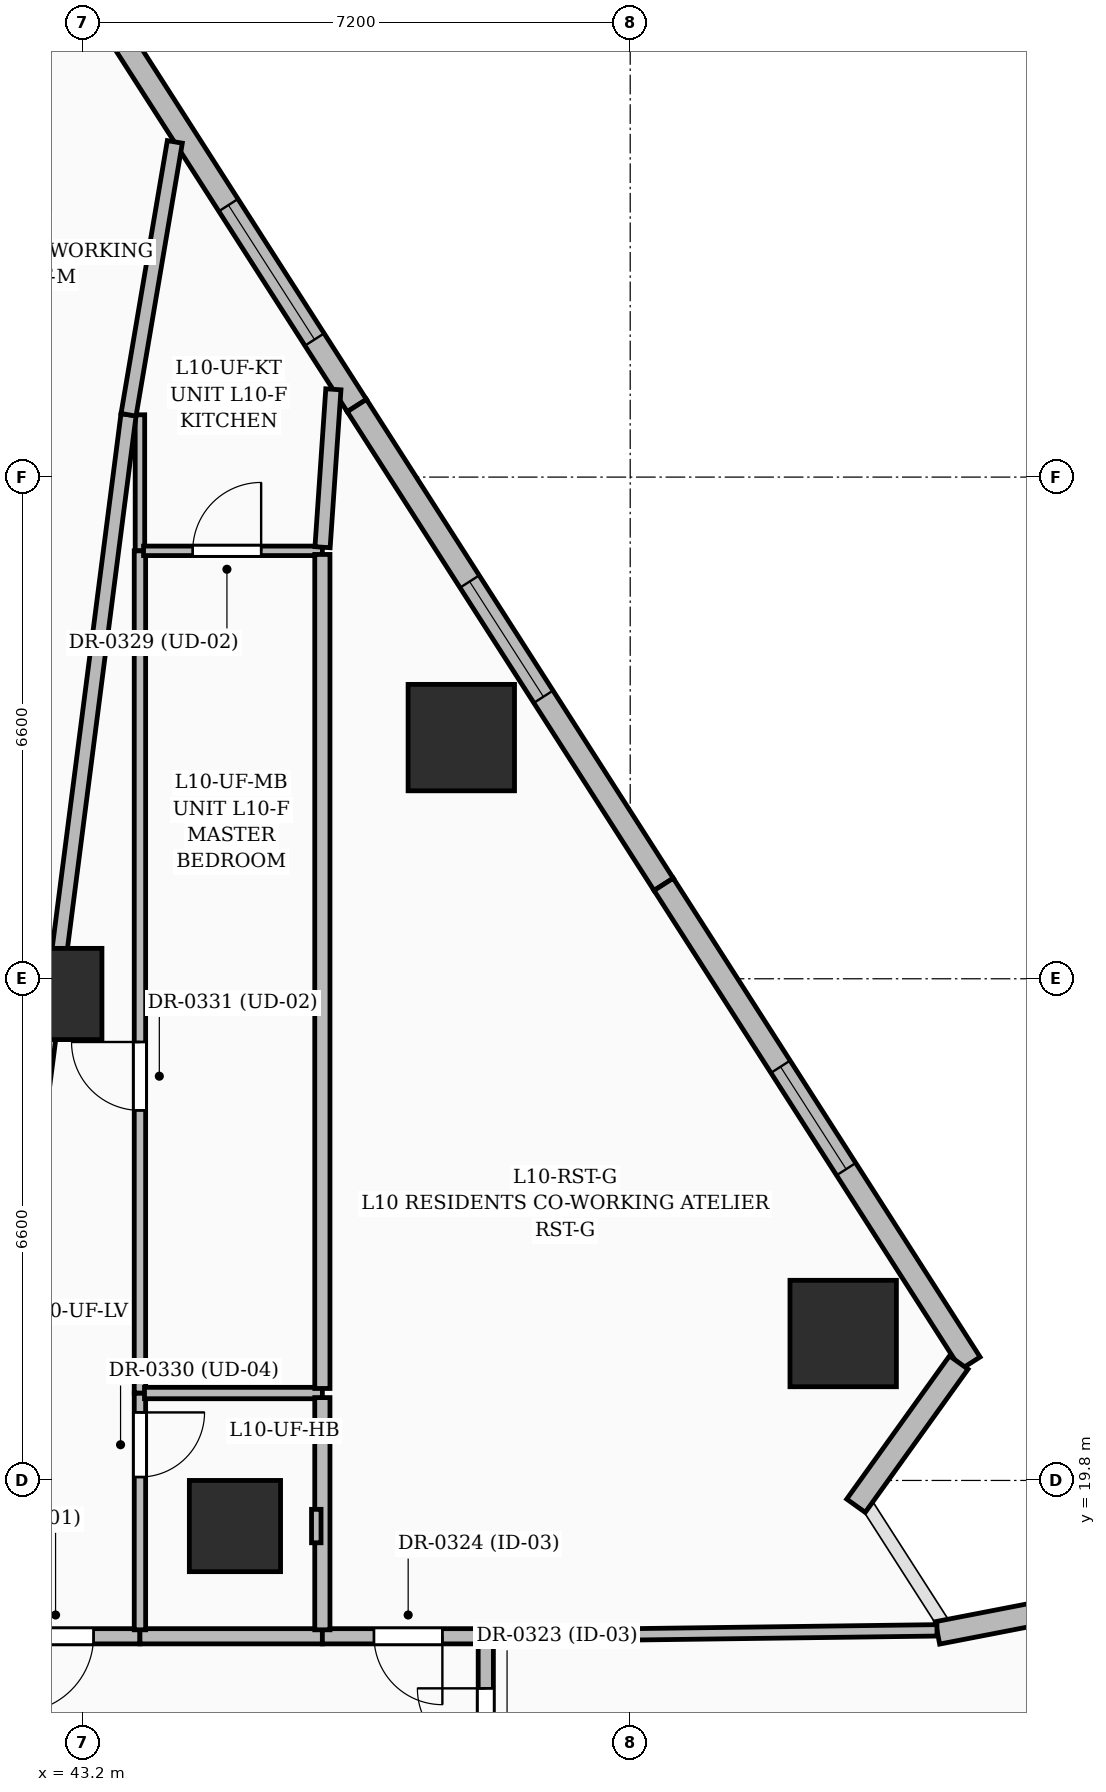
"""IFC4 building model, lengths in metres.
Left out: names, types, materials, properties, quantities, classifications, styles, units other than length and angle.
Written with IfcOpenShell. Run it as: python <this file> out.ifc"""

import sys

from ifc_helpers import new_model, si_unit, direction, frame, frame_2d, origin, origin_2d, place, context, subcontext, project, spatial, rectangle, extrude, element, fill, save


model = new_model("IFC4")
c1 = context("Model", 3, precision=1e-05, world=origin(), true_north=direction((0.0, 1.0)))
c2 = subcontext(c1, "Body", "Model", "MODEL_VIEW")
j1 = project(units=[si_unit("LENGTHUNIT", "METRE"), si_unit("PLANEANGLEUNIT", "RADIAN")], contexts=[c1])
p1 = place(None, origin())
s1 = spatial("IfcSite", under=j1, at=p1, CompositionType="ELEMENT")
p2 = place(p1, origin())
s2 = spatial("IfcBuilding", under=s1, at=p2, CompositionType="ELEMENT")
p3 = place(p2, frame((0.0, 0.0, 46.2)))
s3 = spatial("IfcBuildingStorey", under=s2, at=p3, CompositionType="ELEMENT", Elevation=46.2)
for number, where, z_axis, x_axis in (
    (1, (45.2, 19.2, 0.0), (0.0, 0.0, 1.0), (1.0, 0.0, 0.0)),
    (2, (42.85, 26.2, 0.0), (0.0, 0.0, 1.0), (1.0, 0.0, 0.0)),
):
    element("IfcColumn", number, at=place(p3, frame(where, z_axis=z_axis, x_axis=x_axis)), inside=s3, PredefinedType="COLUMN", context=c2, shape_type="SweptSolid", body=[
        extrude(rectangle(XDim=1.2, YDim=1.2, at=origin_2d()), origin(), (0.0, 0.0, 1.0), 3.6),
    ])
for number, where, z_axis, x_axis in (
    (3, (53.202, 21.733, 0.0), (0.0, 0.0, 1.0), (1.0, 0.0, 0.0)),
    (4, (48.178, 29.573, 0.0), (0.0, 0.0, 1.0), (1.0, 0.0, 0.0)),
):
    element("IfcColumn", number, at=place(p3, frame(where, z_axis=z_axis, x_axis=x_axis)), inside=s3, PredefinedType="COLUMN", context=c2, shape_type="SweptSolid", body=[
        extrude(rectangle(XDim=1.4, YDim=1.4, at=origin_2d()), origin(), (0.0, 0.0, 1.0), 3.6),
    ])
p4 = place(p3, frame((42.767, 40.241, 0.0), z_axis=(0.0, 0.0, 1.0), x_axis=(0.539510136354, -0.841979104712, 0.0)))
e5 = element("IfcWall", 5, at=p4, inside=s3, PredefinedType="SOLIDWALL", context=c2, shape_type="SweptSolid", body=[
    extrude(rectangle(XDim=7.481, YDim=0.3, at=frame_2d((3.741, 0.0))), origin(), (0.0, 0.0, 1.0), 3.35),
])
p5 = place(p4, frame((4.35, 0.0, 0.55)))
e6 = element("IfcOpeningElement", 6, at=p5, cuts=e5, PredefinedType="OPENING", context=c2, shape_type="SweptSolid", body=[
    extrude(rectangle(XDim=2.1, YDim=2.4, at=frame_2d((1.05, 1.2))), frame((0.0, 0.16, 0.0), z_axis=(0.0, -1.0, 0.0), x_axis=(1.0, 0.0, 0.0)), (0.0, 0.0, 1.0), 0.32),
])
p6 = place(p3, frame((46.803, 33.941, 0.0), z_axis=(0.0, 0.0, 1.0), x_axis=(0.539548093607, -0.841954781853, 0.0)))
e7 = element("IfcWall", 7, at=p6, inside=s3, PredefinedType="SOLIDWALL", context=c2, shape_type="SweptSolid", body=[
    extrude(rectangle(XDim=7.481, YDim=0.3, at=frame_2d((3.741, 0.0))), origin(), (0.0, 0.0, 1.0), 3.35),
])
p7 = place(p6, frame((2.75, 0.0, 0.6)))
e8 = element("IfcOpeningElement", 8, at=p7, cuts=e7, PredefinedType="OPENING", context=c2, shape_type="SweptSolid", body=[
    extrude(rectangle(XDim=1.8, YDim=2.1, at=frame_2d((0.9, 1.05))), frame((0.0, 0.16, 0.0), z_axis=(0.0, -1.0, 0.0), x_axis=(1.0, 0.0, 0.0)), (0.0, 0.0, 1.0), 0.32),
])
p8 = place(p3, frame((50.84, 27.642, 0.0), z_axis=(0.0, 0.0, 1.0), x_axis=(0.539510136354, -0.841979104712, 0.0)))
e9 = element("IfcWall", 9, at=p8, inside=s3, PredefinedType="SOLIDWALL", context=c2, shape_type="SweptSolid", body=[
    extrude(rectangle(XDim=7.481, YDim=0.3, at=frame_2d((3.741, 0.0))), origin(), (0.0, 0.0, 1.0), 3.35),
])
p9 = place(p8, frame((2.85, 0.0, 0.55)))
e10 = element("IfcOpeningElement", 10, at=p9, cuts=e9, PredefinedType="OPENING", context=c2, shape_type="SweptSolid", body=[
    extrude(rectangle(XDim=1.6, YDim=2.2, at=frame_2d((0.8, 1.1))), frame((0.0, 0.16, 0.0), z_axis=(0.0, -1.0, 0.0), x_axis=(1.0, 0.0, 0.0)), (0.0, 0.0, 1.0), 0.32),
])
p10 = place(p3, frame((54.722, 21.351, 0.0), z_axis=(0.0, 0.0, 1.0), x_axis=(-0.58303932792, -0.812443931665, 0.0)))
e11 = element("IfcWall", 11, at=p10, inside=s3, PredefinedType="SOLIDWALL", context=c2, shape_type="SweptSolid", body=[
    extrude(rectangle(XDim=2.319, YDim=0.3, at=frame_2d((1.16, 0.0))), origin(), (0.0, 0.0, 1.0), 2.375),
])
p11 = place(p3, frame((54.443, 17.794, 0.0), z_axis=(0.0, 0.0, 1.0), x_axis=(0.981746971615, 0.190191702567, 0.0)))
e12 = element("IfcWall", 12, at=p11, inside=s3, PredefinedType="SOLIDWALL", context=c2, shape_type="SweptSolid", body=[
    extrude(rectangle(XDim=2.593, YDim=0.3, at=frame_2d((1.296, 0.0))), origin(), (0.0, 0.0, 1.0), 2.375),
])
p12 = place(p3, frame((48.5, 15.48, 0.0), z_axis=(0.0, 0.0, 1.0), x_axis=(0.0, 1.0, 0.0)))
e13 = element("IfcWall", 13, at=p12, inside=s3, PredefinedType="PARTITIONING", context=c2, shape_type="SweptSolid", body=[
    extrude(rectangle(XDim=2.27, YDim=0.2, at=frame_2d((1.135, 0.0))), origin(), (0.0, 0.0, 1.0), 2.279),
])
p13 = place(p12, frame((0.685, 0.0, 0.0)))
e14 = element("IfcOpeningElement", 14, at=p13, cuts=e13, PredefinedType="OPENING", context=c2, shape_type="SweptSolid", body=[
    extrude(rectangle(XDim=0.9, YDim=2.1, at=frame_2d((0.45, 1.05))), frame((0.0, 0.11, 0.0), z_axis=(0.0, -1.0, 0.0), x_axis=(1.0, 0.0, 0.0)), (0.0, 0.0, 1.0), 0.22),
])
p14 = place(p3, frame((43.95, 17.75, 0.0), z_axis=(0.0, 0.0, 1.0), x_axis=(-1.0, 0.0, 0.0)))
e15 = element("IfcWall", 15, at=p14, inside=s3, PredefinedType="PARTITIONING", context=c2, shape_type="SweptSolid", body=[
    extrude(rectangle(XDim=2.22, YDim=0.2, at=frame_2d((1.11, 0.0))), origin(), (0.0, 0.0, 1.0), 3.35),
])
p15 = place(p14, frame((0.61, 0.0, 0.0)))
e16 = element("IfcOpeningElement", 16, at=p15, cuts=e15, PredefinedType="OPENING", context=c2, shape_type="SweptSolid", body=[
    extrude(rectangle(XDim=1.0, YDim=2.2, at=frame_2d((0.5, 1.1))), frame((0.0, 0.11, 0.0), z_axis=(0.0, -1.0, 0.0), x_axis=(1.0, 0.0, 0.0)), (0.0, 0.0, 1.0), 0.22),
])
p16 = place(p3, frame((46.35, 17.75, 0.0), z_axis=(0.0, 0.0, 1.0), x_axis=(-1.0, 0.0, 0.0)))
e17 = element("IfcWall", 17, at=p16, inside=s3, PredefinedType="PARTITIONING", context=c2, shape_type="SweptSolid", body=[
    extrude(rectangle(XDim=2.4, YDim=0.2, at=frame_2d((1.2, 0.0))), origin(), (0.0, 0.0, 1.0), 2.309),
])
p17 = place(p3, frame((48.415, 17.75, 0.0), z_axis=(0.0, 0.0, 1.0), x_axis=(-1.0, 0.0, 0.0)))
e18 = element("IfcWall", 18, at=p17, inside=s3, PredefinedType="PARTITIONING", context=c2, shape_type="SweptSolid", body=[
    extrude(rectangle(XDim=2.065, YDim=0.2, at=frame_2d((1.032, 0.0))), origin(), (0.0, 0.0, 1.0), 2.86),
])
p18 = place(p17, frame((0.486, 0.0, 0.0)))
e19 = element("IfcOpeningElement", 19, at=p18, cuts=e18, PredefinedType="OPENING", context=c2, shape_type="SweptSolid", body=[
    extrude(rectangle(XDim=0.9, YDim=2.1, at=frame_2d((0.45, 1.05))), frame((0.0, 0.11, 0.0), z_axis=(0.0, -1.0, 0.0), x_axis=(1.0, 0.0, 0.0)), (0.0, 0.0, 1.0), 0.22),
])
p19 = place(p3, frame((54.436, 17.828, 0.0), z_axis=(0.0, 0.0, 1.0), x_axis=(-0.999914181231, -0.013100769962, 0.0)))
e20 = element("IfcWall", 20, at=p19, inside=s3, PredefinedType="PARTITIONING", context=c2, shape_type="SweptSolid", body=[
    extrude(rectangle(XDim=5.852, YDim=0.15, at=frame_2d((2.926, 0.0))), origin(), (0.0, 0.0, 1.0), 2.279),
])
p20 = place(p3, frame((43.95, 20.95, 0.0), z_axis=(0.0, 0.0, 1.0), x_axis=(0.0, -1.0, 0.0)))
e21 = element("IfcWall", 21, at=p20, inside=s3, PredefinedType="PARTITIONING", context=c2, shape_type="SweptSolid", body=[
    extrude(rectangle(XDim=3.115, YDim=0.15, at=frame_2d((1.558, 0.0))), origin(), (0.0, 0.0, 1.0), 3.35),
])
p21 = place(p20, frame((0.255, 0.0, 0.0)))
e22 = element("IfcOpeningElement", 22, at=p21, cuts=e21, PredefinedType="OPENING", context=c2, shape_type="SweptSolid", body=[
    extrude(rectangle(XDim=0.85, YDim=2.1, at=frame_2d((0.425, 1.05))), frame((0.0, 0.085, 0.0), z_axis=(0.0, -1.0, 0.0), x_axis=(1.0, 0.0, 0.0)), (0.0, 0.0, 1.0), 0.17),
])
p22 = place(p3, frame((43.95, 32.03, 0.0), z_axis=(0.0, 0.0, 1.0), x_axis=(0.0, 1.0, 0.0)))
e23 = element("IfcWall", 23, at=p22, inside=s3, PredefinedType="PARTITIONING", context=c2, shape_type="SweptSolid", body=[
    extrude(rectangle(XDim=1.79, YDim=0.125, at=frame_2d((0.895, 0.0))), origin(), (0.0, 0.0, 1.0), 2.86),
])
p23 = place(p3, frame((43.95, 20.95, 0.0), z_axis=(0.0, 0.0, 1.0), x_axis=(0.0, 1.0, 0.0)))
e24 = element("IfcWall", 24, at=p23, inside=s3, PredefinedType="PARTITIONING", context=c2, shape_type="SweptSolid", body=[
    extrude(rectangle(XDim=11.08, YDim=0.15, at=frame_2d((5.54, 0.0))), origin(), (0.0, 0.0, 1.0), 2.309),
])
p24 = place(p23, frame((3.718, 0.0, 0.0)))
e25 = element("IfcOpeningElement", 25, at=p24, cuts=e24, PredefinedType="OPENING", context=c2, shape_type="SweptSolid", body=[
    extrude(rectangle(XDim=0.9, YDim=2.15, at=frame_2d((0.45, 1.075))), frame((0.0, 0.085, 0.0), z_axis=(0.0, -1.0, 0.0), x_axis=(1.0, 0.0, 0.0)), (0.0, 0.0, 1.0), 0.17),
])
p25 = place(p3, frame((43.8, 33.82, 0.0), z_axis=(0.0, 0.0, 1.0), x_axis=(-0.127751212179, -0.991806245084, 0.0)))
e26 = element("IfcWall", 26, at=p25, inside=s3, PredefinedType="PARTITIONING", context=c2, shape_type="SweptSolid", body=[
    extrude(rectangle(XDim=16.118, YDim=0.2, at=frame_2d((8.059, 0.0))), origin(), (0.0, 0.0, 1.0), 2.279),
])
p26 = place(p3, frame((46.35, 20.95, 0.0), z_axis=(0.0, 0.0, 1.0), x_axis=(-1.0, 0.0, 0.0)))
e27 = element("IfcWall", 27, at=p26, inside=s3, PredefinedType="PARTITIONING", context=c2, shape_type="SweptSolid", body=[
    extrude(rectangle(XDim=2.34, YDim=0.15, at=frame_2d((1.17, 0.0))), origin(), (0.0, 0.0, 1.0), 2.279),
])
p27 = place(p3, frame((46.35, 17.835, 0.0), z_axis=(0.0, 0.0, 1.0), x_axis=(0.0, 1.0, 0.0)))
e28 = element("IfcWall", 28, at=p27, inside=s3, PredefinedType="PARTITIONING", context=c2, shape_type="SweptSolid", body=[
    extrude(rectangle(XDim=3.055, YDim=0.2, at=frame_2d((1.527, 0.0))), origin(), (0.0, 0.0, 1.0), 3.35),
])
p28 = place(p3, frame((43.998, 32.03, 0.0), z_axis=(0.0, 0.0, 1.0), x_axis=(1.0, 0.0, 0.0)))
e29 = element("IfcWall", 29, at=p28, inside=s3, PredefinedType="PARTITIONING", context=c2, shape_type="SweptSolid", body=[
    extrude(rectangle(XDim=2.353, YDim=0.125, at=frame_2d((1.176, 0.0))), origin(), (0.0, 0.0, 1.0), 2.37),
])
p29 = place(p28, frame((0.647, 0.0, 0.0)))
e30 = element("IfcOpeningElement", 30, at=p29, cuts=e29, PredefinedType="OPENING", context=c2, shape_type="SweptSolid", body=[
    extrude(rectangle(XDim=0.9, YDim=2.15, at=frame_2d((0.45, 1.075))), frame((0.0, 0.072, 0.0), z_axis=(0.0, -1.0, 0.0), x_axis=(1.0, 0.0, 0.0)), (0.0, 0.0, 1.0), 0.145),
])
p30 = place(p3, frame((46.352, 32.077, 0.0), z_axis=(0.0, 0.0, 1.0), x_axis=(0.068580805576, 0.997645564871, 0.0)))
e31 = element("IfcWall", 31, at=p30, inside=s3, PredefinedType="PARTITIONING", context=c2, shape_type="SweptSolid", body=[
    extrude(rectangle(XDim=2.083, YDim=0.2, at=frame_2d((1.041, 0.0))), origin(), (0.0, 0.0, 1.0), 2.37),
])
p31 = place(p3, frame((44.409, 37.41, 0.0), z_axis=(0.0, 0.0, 1.0), x_axis=(-0.167225329542, -0.985918703119, 0.0)))
e32 = element("IfcWall", 32, at=p31, inside=s3, PredefinedType="PARTITIONING", context=c2, shape_type="SweptSolid", body=[
    extrude(rectangle(XDim=3.641, YDim=0.2, at=frame_2d((1.821, 0.0))), origin(), (0.0, 0.0, 1.0), 2.37),
])
p32 = place(p3, frame((46.35, 21.01, 0.0), z_axis=(0.0, 0.0, 1.0), x_axis=(0.0, 1.0, 0.0)))
e33 = element("IfcWall", 33, at=p32, inside=s3, PredefinedType="PARTITIONING", context=c2, shape_type="SweptSolid", body=[
    extrude(rectangle(XDim=10.972, YDim=0.2, at=frame_2d((5.486, 0.0))), origin(), (0.0, 0.0, 1.0), 2.279),
])
p33 = place(p3, frame((46.27, 19.42, 0.0), z_axis=(0.0, 0.0, 1.0), x_axis=(0.0, -1.0, 0.0)))
e34 = element("IfcWall", 34, at=p33, inside=s3, PredefinedType="PARTITIONING", context=c2, shape_type="SweptSolid", body=[
    extrude(rectangle(XDim=0.44, YDim=0.125, at=frame_2d((0.22, 0.0))), origin(), (0.0, 0.0, 1.0), 3.35),
])
p34 = place(p5, origin())
e35 = element("IfcWindow", 35, at=p34, inside=s3, PartitioningType="SINGLE_PANEL", PredefinedType="WINDOW", context=c2, shape_type="SweptSolid", body=[
    extrude(rectangle(XDim=2.1, YDim=2.4, at=frame_2d((1.05, 1.2))), frame((0.0, 0.03, 0.0), z_axis=(0.0, -1.0, 0.0), x_axis=(1.0, 0.0, 0.0)), (0.0, 0.0, 1.0), 0.06),
])
fill(e6, e35)
p35 = place(p7, origin())
e36 = element("IfcWindow", 36, at=p35, inside=s3, PartitioningType="SINGLE_PANEL", PredefinedType="WINDOW", context=c2, shape_type="SweptSolid", body=[
    extrude(rectangle(XDim=1.8, YDim=2.1, at=frame_2d((0.9, 1.05))), frame((0.0, 0.03, 0.0), z_axis=(0.0, -1.0, 0.0), x_axis=(1.0, 0.0, 0.0)), (0.0, 0.0, 1.0), 0.06),
])
fill(e8, e36)
p36 = place(p9, origin())
e37 = element("IfcWindow", 37, at=p36, inside=s3, PartitioningType="SINGLE_PANEL", PredefinedType="WINDOW", context=c2, shape_type="SweptSolid", body=[
    extrude(rectangle(XDim=1.6, YDim=2.2, at=frame_2d((0.8, 1.1))), frame((0.0, 0.03, 0.0), z_axis=(0.0, -1.0, 0.0), x_axis=(1.0, 0.0, 0.0)), (0.0, 0.0, 1.0), 0.06),
])
fill(e10, e37)
p37 = place(p13, origin())
e38 = element("IfcDoor", 38, at=p37, inside=s3, OperationType="SINGLE_SWING_RIGHT", PredefinedType="DOOR", context=c2, shape_type="SweptSolid", body=[
    extrude(rectangle(XDim=0.9, YDim=2.1, at=frame_2d((0.45, 1.05))), frame((0.0, 0.025, 0.0), z_axis=(0.0, -1.0, 0.0), x_axis=(1.0, 0.0, 0.0)), (0.0, 0.0, 1.0), 0.05),
])
fill(e14, e38)
p38 = place(p18, origin())
e39 = element("IfcDoor", 39, at=p38, inside=s3, OperationType="SINGLE_SWING_LEFT", PredefinedType="DOOR", context=c2, shape_type="SweptSolid", body=[
    extrude(rectangle(XDim=0.9, YDim=2.1, at=frame_2d((0.45, 1.05))), frame((0.0, 0.025, 0.0), z_axis=(0.0, -1.0, 0.0), x_axis=(1.0, 0.0, 0.0)), (0.0, 0.0, 1.0), 0.05),
])
fill(e19, e39)
p39 = place(p15, origin())
e40 = element("IfcDoor", 40, at=p39, inside=s3, OperationType="SINGLE_SWING_RIGHT", PredefinedType="DOOR", context=c2, shape_type="SweptSolid", body=[
    extrude(rectangle(XDim=1.0, YDim=2.2, at=frame_2d((0.5, 1.1))), frame((0.0, 0.025, 0.0), z_axis=(0.0, -1.0, 0.0), x_axis=(1.0, 0.0, 0.0)), (0.0, 0.0, 1.0), 0.05),
])
fill(e16, e40)
p40 = place(p29, origin())
e41 = element("IfcDoor", 41, at=p40, inside=s3, OperationType="SINGLE_SWING_RIGHT", PredefinedType="DOOR", context=c2, shape_type="SweptSolid", body=[
    extrude(rectangle(XDim=0.9, YDim=2.15, at=frame_2d((0.45, 1.075))), frame((0.0, 0.025, 0.0), z_axis=(0.0, -1.0, 0.0), x_axis=(1.0, 0.0, 0.0)), (0.0, 0.0, 1.0), 0.05),
])
fill(e30, e41)
p41 = place(p21, origin())
e42 = element("IfcDoor", 42, at=p41, inside=s3, OperationType="SINGLE_SWING_LEFT", PredefinedType="DOOR", context=c2, shape_type="SweptSolid", body=[
    extrude(rectangle(XDim=0.85, YDim=2.1, at=frame_2d((0.425, 1.05))), frame((0.0, 0.025, 0.0), z_axis=(0.0, -1.0, 0.0), x_axis=(1.0, 0.0, 0.0)), (0.0, 0.0, 1.0), 0.05),
])
fill(e22, e42)
p42 = place(p24, origin())
e43 = element("IfcDoor", 43, at=p42, inside=s3, OperationType="SINGLE_SWING_RIGHT", PredefinedType="DOOR", context=c2, shape_type="SweptSolid", body=[
    extrude(rectangle(XDim=0.9, YDim=2.15, at=frame_2d((0.45, 1.075))), frame((0.0, 0.025, 0.0), z_axis=(0.0, -1.0, 0.0), x_axis=(1.0, 0.0, 0.0)), (0.0, 0.0, 1.0), 0.05),
])
fill(e25, e43)
save(model, sys.argv[1])
